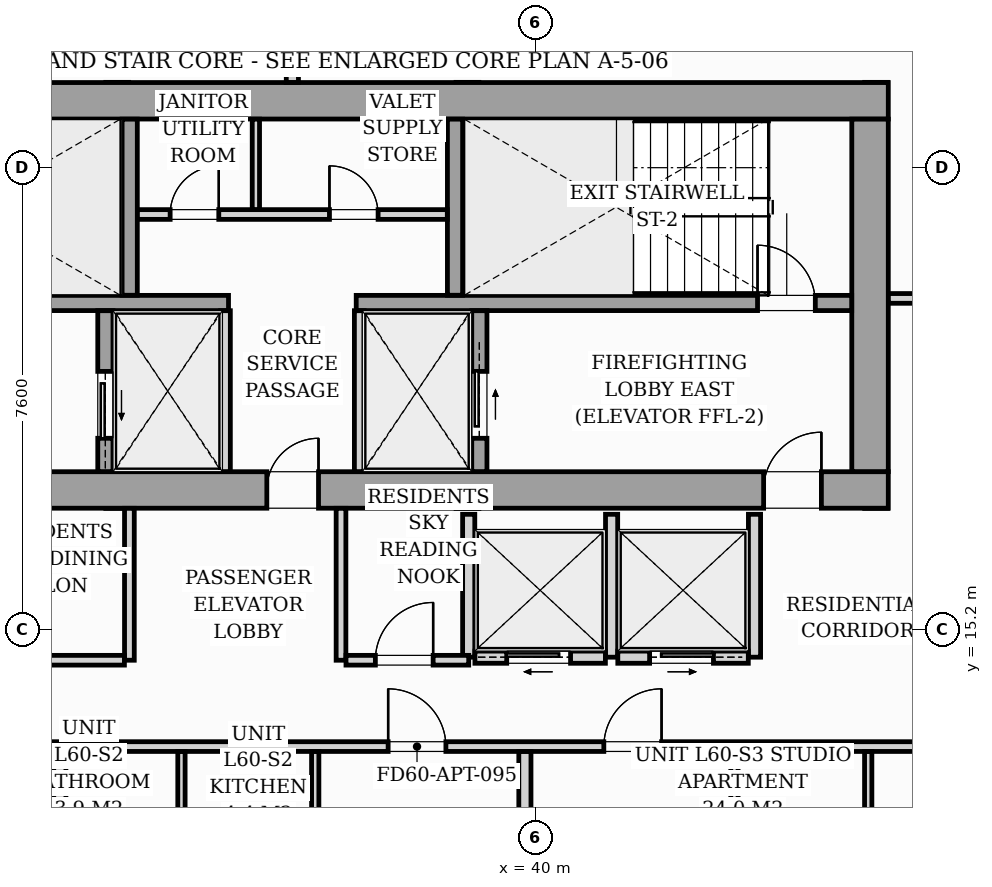
"""IFC4 building model, lengths in metres.
Left out: names, types, materials, properties, quantities, classifications, styles, units other than length and angle.
Written with IfcOpenShell. Run it as: python <this file> out.ifc"""

import sys

from ifc_helpers import new_model, si_unit, direction, frame, frame_2d, origin, origin_2d, place, context, subcontext, project, spatial, rectangle, i_section, extrude, source, transform, mapped, element, fill, save


model = new_model("IFC4")
c1 = context("Model", 3, precision=1e-05, world=origin(), true_north=direction((0.0, 1.0)))
c2 = subcontext(c1, "Body", "Model", "MODEL_VIEW")
j1 = project(units=[si_unit("LENGTHUNIT", "METRE"), si_unit("PLANEANGLEUNIT", "RADIAN")], contexts=[c1])
p1 = place(None, origin())
s1 = spatial("IfcSite", under=j1, at=p1, CompositionType="ELEMENT")
p2 = place(p1, origin())
s2 = spatial("IfcBuilding", under=s1, at=p2, CompositionType="ELEMENT")
p3 = place(p2, frame((0.0, 0.0, 208.2)))
s3 = spatial("IfcBuildingStorey", under=s2, at=p3, CompositionType="ELEMENT", Elevation=208.2)
m1 = source(origin(), c2, "Body", "SweptSolid", [
    extrude(i_section(OverallWidth=0.416, OverallDepth=0.446, WebThickness=0.039, FlangeThickness=0.063, FilletRadius=0.018, at=origin_2d()), origin(), (0.0, 0.0, 1.0), 3.196),
])
for number, where, z_axis, x_axis in (
    (1, (33.12, 17.4, 0.002), (0.0, 0.0, 1.0), (1.0, 0.0, 0.0)),
    (2, (38.88, 17.4, 0.002), (0.0, 0.0, 1.0), (1.0, 0.0, 0.0)),
    (3, (45.6, 17.4, 0.002), (0.0, 0.0, 1.0), (1.0, 0.0, 0.0)),
    (4, (33.12, 24.0, 0.002), (0.0, 0.0, 1.0), (1.0, 0.0, 0.0)),
    (5, (38.88, 24.0, 0.002), (0.0, 0.0, 1.0), (1.0, 0.0, 0.0)),
    (6, (45.6, 24.0, 0.002), (0.0, 0.0, 1.0), (1.0, 0.0, 0.0)),
):
    element("IfcColumn", number, at=place(p3, frame(where, z_axis=z_axis, x_axis=x_axis)), inside=s3, PredefinedType="PILASTER", context=c2, shape_type="MappedRepresentation", body=[
        mapped(m1, transform((0.0, 0.0, 0.0), scale=1.0)),
    ])
p4 = place(p3, frame((26.2, 17.5, 0.0), z_axis=(0.0, 0.0, 1.0), x_axis=(1.0, 0.0, 0.0)))
e7 = element("IfcWall", 7, at=p4, inside=s3, PredefinedType="SHEAR", context=c2, shape_type="SweptSolid", body=[
    extrude(rectangle(XDim=19.6, YDim=0.6, at=frame_2d((9.8, 0.0))), origin(), (0.0, 0.0, 1.0), 3.2),
])
p5 = place(p4, frame((0.95, 0.0, 0.0)))
e8 = element("IfcOpeningElement", 8, at=p5, cuts=e7, PredefinedType="OPENING", context=c2, shape_type="SweptSolid", body=[
    extrude(rectangle(XDim=0.95, YDim=2.06, at=frame_2d((0.475, 1.03))), frame((0.0, 0.31, 0.0), z_axis=(0.0, -1.0, 0.0), x_axis=(1.0, 0.0, 0.0)), (0.0, 0.0, 1.0), 0.62),
])
p6 = place(p4, frame((9.38, 0.0, 0.0)))
e9 = element("IfcOpeningElement", 9, at=p6, cuts=e7, PredefinedType="OPENING", context=c2, shape_type="SweptSolid", body=[
    extrude(rectangle(XDim=0.85, YDim=2.0, at=frame_2d((0.425, 1.0))), frame((0.0, 0.31, 0.0), z_axis=(0.0, -1.0, 0.0), x_axis=(1.0, 0.0, 0.0)), (0.0, 0.0, 1.0), 0.62),
])
p7 = place(p4, frame((17.55, 0.0, 0.0)))
e10 = element("IfcOpeningElement", 10, at=p7, cuts=e7, PredefinedType="OPENING", context=c2, shape_type="SweptSolid", body=[
    extrude(rectangle(XDim=0.95, YDim=2.06, at=frame_2d((0.475, 1.03))), frame((0.0, 0.31, 0.0), z_axis=(0.0, -1.0, 0.0), x_axis=(1.0, 0.0, 0.0)), (0.0, 0.0, 1.0), 0.62),
])
p8 = place(p3, frame((26.2, 23.9, 0.0), z_axis=(0.0, 0.0, 1.0), x_axis=(1.0, 0.0, 0.0)))
e11 = element("IfcWall", 11, at=p8, inside=s3, PredefinedType="SHEAR", context=c2, shape_type="SweptSolid", body=[
    extrude(rectangle(XDim=19.6, YDim=0.6, at=frame_2d((9.8, 0.0))), origin(), (0.0, 0.0, 1.0), 3.2),
])
p9 = place(p3, frame((45.5, 17.802, 0.0), z_axis=(0.0, 0.0, 1.0), x_axis=(0.0, 1.0, 0.0)))
e12 = element("IfcWall", 12, at=p9, inside=s3, PredefinedType="SHEAR", context=c2, shape_type="SweptSolid", body=[
    extrude(rectangle(XDim=5.796, YDim=0.6, at=frame_2d((2.898, 0.0))), origin(), (0.0, 0.0, 1.0), 3.2),
])
p10 = place(p3, frame((26.802, 20.575, 0.0), z_axis=(0.0, 0.0, 1.0), x_axis=(1.0, 0.0, 0.0)))
e13 = element("IfcWall", 13, at=p10, inside=s3, PredefinedType="SOLIDWALL", context=c2, shape_type="SweptSolid", body=[
    extrude(rectangle(XDim=8.148, YDim=0.25, at=frame_2d((4.074, 0.0))), origin(), (0.0, 0.0, 1.0), 3.2),
])
p11 = place(p10, frame((0.298, 0.0, 0.0)))
e14 = element("IfcOpeningElement", 14, at=p11, cuts=e13, PredefinedType="OPENING", context=c2, shape_type="SweptSolid", body=[
    extrude(rectangle(XDim=0.95, YDim=2.06, at=frame_2d((0.475, 1.03))), frame((0.0, 0.135, 0.0), z_axis=(0.0, -1.0, 0.0), x_axis=(1.0, 0.0, 0.0)), (0.0, 0.0, 1.0), 0.27),
])
p12 = place(p3, frame((37.05, 20.575, 0.0), z_axis=(0.0, 0.0, 1.0), x_axis=(1.0, 0.0, 0.0)))
e15 = element("IfcWall", 15, at=p12, inside=s3, PredefinedType="SOLIDWALL", context=c2, shape_type="SweptSolid", body=[
    extrude(rectangle(XDim=8.148, YDim=0.25, at=frame_2d((4.074, 0.0))), origin(), (0.0, 0.0, 1.0), 3.2),
])
p13 = place(p12, frame((6.6, 0.0, 0.0)))
e16 = element("IfcOpeningElement", 16, at=p13, cuts=e15, PredefinedType="OPENING", context=c2, shape_type="SweptSolid", body=[
    extrude(rectangle(XDim=0.95, YDim=2.06, at=frame_2d((0.475, 1.03))), frame((0.0, 0.135, 0.0), z_axis=(0.0, -1.0, 0.0), x_axis=(1.0, 0.0, 0.0)), (0.0, 0.0, 1.0), 0.27),
])
for number, where, z_axis, x_axis in (
    (17, (33.325, 20.702, 0.0), (0.0, 0.0, 1.0), (0.0, 1.0, 0.0)),
    (18, (38.675, 20.702, 0.0), (0.0, 0.0, 1.0), (0.0, 1.0, 0.0)),
):
    element("IfcWall", number, at=place(p3, frame(where, z_axis=z_axis, x_axis=x_axis)), inside=s3, PredefinedType="SOLIDWALL", context=c2, shape_type="SweptSolid", body=[
        extrude(rectangle(XDim=2.896, YDim=0.25, at=frame_2d((1.448, 0.0))), origin(), (0.0, 0.0, 1.0), 3.2),
    ])
p14 = place(p3, frame((32.925, 17.802, 0.0), z_axis=(0.0, 0.0, 1.0), x_axis=(0.0, 1.0, 0.0)))
e19 = element("IfcWall", 19, at=p14, inside=s3, PredefinedType="SOLIDWALL", context=c2, shape_type="SweptSolid", body=[
    extrude(rectangle(XDim=2.646, YDim=0.25, at=frame_2d((1.323, 0.0))), origin(), (0.0, 0.0, 1.0), 3.2),
])
p15 = place(p14, frame((0.548, 0.0, 0.0)))
e20 = element("IfcOpeningElement", 20, at=p15, cuts=e19, PredefinedType="OPENING", context=c2, shape_type="SweptSolid", body=[
    extrude(rectangle(XDim=1.1, YDim=2.08, at=frame_2d((0.55, 1.04))), frame((0.0, 0.135, 0.0), z_axis=(0.0, -1.0, 0.0), x_axis=(1.0, 0.0, 0.0)), (0.0, 0.0, 1.0), 0.27),
])
for number, where, z_axis, x_axis in (
    (21, (34.9, 17.802, 0.0), (0.0, 0.0, 1.0), (0.0, 1.0, 0.0)),
    (22, (37.1, 17.802, 0.0), (0.0, 0.0, 1.0), (0.0, 1.0, 0.0)),
):
    element("IfcWall", number, at=place(p3, frame(where, z_axis=z_axis, x_axis=x_axis)), inside=s3, PredefinedType="PARTITIONING", context=c2, shape_type="SweptSolid", body=[
        extrude(rectangle(XDim=2.646, YDim=0.16, at=frame_2d((1.323, 0.0))), origin(), (0.0, 0.0, 1.0), 2.9),
    ])
p16 = place(p3, frame((39.075, 17.802, 0.0), z_axis=(0.0, 0.0, 1.0), x_axis=(0.0, 1.0, 0.0)))
e23 = element("IfcWall", 23, at=p16, inside=s3, PredefinedType="SOLIDWALL", context=c2, shape_type="SweptSolid", body=[
    extrude(rectangle(XDim=2.646, YDim=0.25, at=frame_2d((1.323, 0.0))), origin(), (0.0, 0.0, 1.0), 3.2),
])
p17 = place(p16, frame((0.548, 0.0, 0.0)))
e24 = element("IfcOpeningElement", 24, at=p17, cuts=e23, PredefinedType="OPENING", context=c2, shape_type="SweptSolid", body=[
    extrude(rectangle(XDim=1.1, YDim=2.08, at=frame_2d((0.55, 1.04))), frame((0.0, 0.135, 0.0), z_axis=(0.0, -1.0, 0.0), x_axis=(1.0, 0.0, 0.0)), (0.0, 0.0, 1.0), 0.27),
])
p18 = place(p3, frame((33.452, 22.03, 0.0), z_axis=(0.0, 0.0, 1.0), x_axis=(1.0, 0.0, 0.0)))
e25 = element("IfcWall", 25, at=p18, inside=s3, PredefinedType="PARTITIONING", context=c2, shape_type="SweptSolid", body=[
    extrude(rectangle(XDim=5.096, YDim=0.16, at=frame_2d((2.548, 0.0))), origin(), (0.0, 0.0, 1.0), 2.9),
])
p19 = place(p18, frame((0.538, 0.0, 0.0)))
e26 = element("IfcOpeningElement", 26, at=p19, cuts=e25, PredefinedType="OPENING", context=c2, shape_type="SweptSolid", body=[
    extrude(rectangle(XDim=0.8, YDim=2.05, at=frame_2d((0.4, 1.025))), frame((0.0, 0.09, 0.0), z_axis=(0.0, -1.0, 0.0), x_axis=(1.0, 0.0, 0.0)), (0.0, 0.0, 1.0), 0.18),
])
p20 = place(p18, frame((3.158, 0.0, 0.0)))
e27 = element("IfcOpeningElement", 27, at=p20, cuts=e25, PredefinedType="OPENING", context=c2, shape_type="SweptSolid", body=[
    extrude(rectangle(XDim=0.8, YDim=2.05, at=frame_2d((0.4, 1.025))), frame((0.0, 0.09, 0.0), z_axis=(0.0, -1.0, 0.0), x_axis=(1.0, 0.0, 0.0)), (0.0, 0.0, 1.0), 0.18),
])
p21 = place(p3, frame((35.4, 22.112, 0.0), z_axis=(0.0, 0.0, 1.0), x_axis=(0.0, 1.0, 0.0)))
e28 = element("IfcWall", 28, at=p21, inside=s3, PredefinedType="PARTITIONING", context=c2, shape_type="SweptSolid", body=[
    extrude(rectangle(XDim=1.486, YDim=0.12, at=frame_2d((0.743, 0.0))), origin(), (0.0, 0.0, 1.0), 2.9),
])
for number, where, z_axis, x_axis in (
    (29, (38.9, 14.75, 0.0), (0.0, 0.0, 1.0), (0.0, 1.0, 0.0)),
    (30, (41.25, 14.75, 0.0), (0.0, 0.0, 1.0), (0.0, 1.0, 0.0)),
    (31, (43.6, 14.75, 0.0), (0.0, 0.0, 1.0), (0.0, 1.0, 0.0)),
):
    element("IfcWall", number, at=place(p3, frame(where, z_axis=z_axis, x_axis=x_axis)), inside=s3, PredefinedType="PARTITIONING", context=c2, shape_type="SweptSolid", body=[
        extrude(rectangle(XDim=2.35, YDim=0.2, at=frame_2d((1.175, 0.0))), origin(), (0.0, 0.0, 1.0), 2.9),
    ])
p22 = place(p3, frame((39.002, 14.75, 0.0), z_axis=(0.0, 0.0, 1.0), x_axis=(1.0, 0.0, 0.0)))
e32 = element("IfcWall", 32, at=p22, inside=s3, PredefinedType="PARTITIONING", context=c2, shape_type="SweptSolid", body=[
    extrude(rectangle(XDim=2.146, YDim=0.2, at=frame_2d((1.073, 0.0))), origin(), (0.0, 0.0, 1.0), 2.9),
])
p23 = place(p22, frame((0.523, 0.0, 0.0)))
e33 = element("IfcOpeningElement", 33, at=p23, cuts=e32, PredefinedType="OPENING", context=c2, shape_type="SweptSolid", body=[
    extrude(rectangle(XDim=1.05, YDim=2.08, at=frame_2d((0.525, 1.04))), frame((0.0, 0.11, 0.0), z_axis=(0.0, -1.0, 0.0), x_axis=(1.0, 0.0, 0.0)), (0.0, 0.0, 1.0), 0.22),
])
p24 = place(p3, frame((41.352, 14.75, 0.0), z_axis=(0.0, 0.0, 1.0), x_axis=(1.0, 0.0, 0.0)))
e34 = element("IfcWall", 34, at=p24, inside=s3, PredefinedType="PARTITIONING", context=c2, shape_type="SweptSolid", body=[
    extrude(rectangle(XDim=2.146, YDim=0.2, at=frame_2d((1.073, 0.0))), origin(), (0.0, 0.0, 1.0), 2.9),
])
p25 = place(p24, frame((0.523, 0.0, 0.0)))
e35 = element("IfcOpeningElement", 35, at=p25, cuts=e34, PredefinedType="OPENING", context=c2, shape_type="SweptSolid", body=[
    extrude(rectangle(XDim=1.05, YDim=2.08, at=frame_2d((0.525, 1.04))), frame((0.0, 0.11, 0.0), z_axis=(0.0, -1.0, 0.0), x_axis=(1.0, 0.0, 0.0)), (0.0, 0.0, 1.0), 0.22),
])
p26 = place(p3, frame((24.55, 13.28, 0.0), z_axis=(0.0, 0.0, 1.0), x_axis=(1.0, 0.0, 0.0)))
e36 = element("IfcWall", 36, at=p26, inside=s3, PredefinedType="PARTITIONING", context=c2, shape_type="SweptSolid", body=[
    extrude(rectangle(XDim=22.9, YDim=0.16, at=frame_2d((11.45, 0.0))), origin(), (0.0, 0.0, 1.0), 2.9),
])
p27 = place(p26, frame((5.378, 0.0, 0.0)))
e37 = element("IfcOpeningElement", 37, at=p27, cuts=e36, PredefinedType="OPENING", context=c2, shape_type="SweptSolid", body=[
    extrude(rectangle(XDim=0.95, YDim=2.06, at=frame_2d((0.475, 1.03))), frame((0.0, 0.09, 0.0), z_axis=(0.0, -1.0, 0.0), x_axis=(1.0, 0.0, 0.0)), (0.0, 0.0, 1.0), 0.18),
])
p28 = place(p26, frame((13.025, 0.0, 0.0)))
e38 = element("IfcOpeningElement", 38, at=p28, cuts=e36, PredefinedType="OPENING", context=c2, shape_type="SweptSolid", body=[
    extrude(rectangle(XDim=0.95, YDim=2.06, at=frame_2d((0.475, 1.03))), frame((0.0, 0.09, 0.0), z_axis=(0.0, -1.0, 0.0), x_axis=(1.0, 0.0, 0.0)), (0.0, 0.0, 1.0), 0.18),
])
p29 = place(p26, frame((16.572, 0.0, 0.0)))
e39 = element("IfcOpeningElement", 39, at=p29, cuts=e36, PredefinedType="OPENING", context=c2, shape_type="SweptSolid", body=[
    extrude(rectangle(XDim=0.95, YDim=2.06, at=frame_2d((0.475, 1.03))), frame((0.0, 0.09, 0.0), z_axis=(0.0, -1.0, 0.0), x_axis=(1.0, 0.0, 0.0)), (0.0, 0.0, 1.0), 0.18),
])
p30 = place(p3, frame((36.0, 24.202, 0.0), z_axis=(0.0, 0.0, 1.0), x_axis=(0.0, 1.0, 0.0)))
e40 = element("IfcWall", 40, at=p30, inside=s3, PredefinedType="PARTITIONING", context=c2, shape_type="SweptSolid", body=[
    extrude(rectangle(XDim=2.152, YDim=0.2, at=frame_2d((1.076, 0.0))), origin(), (0.0, 0.0, 1.0), 2.9),
])
p31 = place(p3, frame((45.802, 20.65, 0.0), z_axis=(0.0, 0.0, 1.0), x_axis=(1.0, 0.0, 0.0)))
e41 = element("IfcWall", 41, at=p31, inside=s3, PredefinedType="PARTITIONING", context=c2, shape_type="SweptSolid", body=[
    extrude(rectangle(XDim=1.566, YDim=0.16, at=frame_2d((0.783, 0.0))), origin(), (0.0, 0.0, 1.0), 2.9),
])
p32 = place(p3, frame((32.176, 7.844, 0.0), z_axis=(0.0, 0.0, 1.0), x_axis=(0.0, 1.0, 0.0)))
e42 = element("IfcWall", 42, at=p32, inside=s3, PredefinedType="PARTITIONING", context=c2, shape_type="SweptSolid", body=[
    extrude(rectangle(XDim=5.354, YDim=0.2, at=frame_2d((2.677, 0.0))), origin(), (0.0, 0.0, 1.0), 2.9),
])
for number, where, z_axis, x_axis in (
    (43, (36.376, 11.092, 0.0), (0.0, 0.0, 1.0), (0.0, 1.0, 0.0)),
    (44, (34.176, 11.092, 0.0), (0.0, 0.0, 1.0), (0.0, 1.0, 0.0)),
):
    element("IfcWall", number, at=place(p3, frame(where, z_axis=z_axis, x_axis=x_axis)), inside=s3, PredefinedType="PARTITIONING", context=c2, shape_type="SweptSolid", body=[
        extrude(rectangle(XDim=2.106, YDim=0.12, at=frame_2d((1.053, 0.0))), origin(), (0.0, 0.0, 1.0), 2.9),
    ])
p33 = place(p3, frame((39.824, 8.398, 0.0), z_axis=(0.0, 0.0, 1.0), x_axis=(0.0, 1.0, 0.0)))
e45 = element("IfcWall", 45, at=p33, inside=s3, PredefinedType="PARTITIONING", context=c2, shape_type="SweptSolid", body=[
    extrude(rectangle(XDim=4.8, YDim=0.2, at=frame_2d((2.4, 0.0))), origin(), (0.0, 0.0, 1.0), 2.9),
])
for number, where, z_axis, x_axis in (
    (46, (43.27, 11.234, 0.0), (0.0, 0.0, 1.0), (0.0, 1.0, 0.0)),
    (47, (45.47, 11.234, 0.0), (0.0, 0.0, 1.0), (0.0, 1.0, 0.0)),
):
    element("IfcWall", number, at=place(p3, frame(where, z_axis=z_axis, x_axis=x_axis)), inside=s3, PredefinedType="PARTITIONING", context=c2, shape_type="SweptSolid", body=[
        extrude(rectangle(XDim=1.964, YDim=0.12, at=frame_2d((0.982, 0.0))), origin(), (0.0, 0.0, 1.0), 2.9),
    ])
p34 = place(p3, frame((33.32, 14.7, 0.0), z_axis=(0.0, 0.0, 1.0), x_axis=(0.0, 1.0, 0.0)))
e48 = element("IfcWall", 48, at=p34, inside=s3, PredefinedType="PARTITIONING", context=c2, shape_type="SweptSolid", body=[
    extrude(rectangle(XDim=2.498, YDim=0.16, at=frame_2d((1.249, 0.0))), origin(), (0.0, 0.0, 1.0), 2.9),
])
p35 = place(p3, frame((28.442, 14.7, 0.0), z_axis=(0.0, 0.0, 1.0), x_axis=(1.0, 0.0, 0.0)))
e49 = element("IfcWall", 49, at=p35, inside=s3, PredefinedType="PARTITIONING", context=c2, shape_type="SweptSolid", body=[
    extrude(rectangle(XDim=4.796, YDim=0.16, at=frame_2d((2.398, 0.0))), origin(), (0.0, 0.0, 1.0), 2.9),
])
p36 = place(p35, frame((1.923, 0.0, 0.0)))
e50 = element("IfcOpeningElement", 50, at=p36, cuts=e49, PredefinedType="OPENING", context=c2, shape_type="SweptSolid", body=[
    extrude(rectangle(XDim=0.95, YDim=2.06, at=frame_2d((0.475, 1.03))), frame((0.0, 0.09, 0.0), z_axis=(0.0, -1.0, 0.0), x_axis=(1.0, 0.0, 0.0)), (0.0, 0.0, 1.0), 0.18),
])
p37 = place(p3, frame((36.8, 14.7, 0.0), z_axis=(0.0, 0.0, 1.0), x_axis=(0.0, 1.0, 0.0)))
e51 = element("IfcWall", 51, at=p37, inside=s3, PredefinedType="PARTITIONING", context=c2, shape_type="SweptSolid", body=[
    extrude(rectangle(XDim=2.498, YDim=0.16, at=frame_2d((1.249, 0.0))), origin(), (0.0, 0.0, 1.0), 2.9),
])
p38 = place(p3, frame((36.882, 14.7, 0.0), z_axis=(0.0, 0.0, 1.0), x_axis=(1.0, 0.0, 0.0)))
e52 = element("IfcWall", 52, at=p38, inside=s3, PredefinedType="PARTITIONING", context=c2, shape_type="SweptSolid", body=[
    extrude(rectangle(XDim=2.018, YDim=0.16, at=frame_2d((1.009, 0.0))), origin(), (0.0, 0.0, 1.0), 2.9),
])
p39 = place(p38, frame((0.483, 0.0, 0.0)))
e53 = element("IfcOpeningElement", 53, at=p39, cuts=e52, PredefinedType="OPENING", context=c2, shape_type="SweptSolid", body=[
    extrude(rectangle(XDim=0.95, YDim=2.06, at=frame_2d((0.475, 1.03))), frame((0.0, 0.09, 0.0), z_axis=(0.0, -1.0, 0.0), x_axis=(1.0, 0.0, 0.0)), (0.0, 0.0, 1.0), 0.18),
])
m2 = source(origin(), c2, "Body", "SweptSolid", [
    extrude(rectangle(XDim=0.85, YDim=2.0, at=frame_2d((0.425, 1.0))), frame((0.0, 0.025, 0.0), z_axis=(0.0, -1.0, 0.0), x_axis=(1.0, 0.0, 0.0)), (0.0, 0.0, 1.0), 0.05),
])
p40 = place(p6, origin())
e54 = element("IfcDoor", 54, at=p40, inside=s3, OperationType="SINGLE_SWING_RIGHT", PredefinedType="DOOR", context=c2, shape_type="MappedRepresentation", body=[
    mapped(m2, transform((0.0, 0.0, 0.0), scale=1.0)),
])
fill(e9, e54)
m3 = source(origin(), c2, "Body", "SweptSolid", [
    extrude(rectangle(XDim=0.95, YDim=2.06, at=frame_2d((0.475, 1.03))), frame((0.0, 0.025, 0.0), z_axis=(0.0, -1.0, 0.0), x_axis=(1.0, 0.0, 0.0)), (0.0, 0.0, 1.0), 0.05),
])
p41 = place(p7, origin())
e55 = element("IfcDoor", 55, at=p41, inside=s3, OperationType="SINGLE_SWING_RIGHT", PredefinedType="DOOR", context=c2, shape_type="MappedRepresentation", body=[
    mapped(m3, transform((0.0, 0.0, 0.0), scale=1.0)),
])
fill(e10, e55)
p42 = place(p13, origin())
e56 = element("IfcDoor", 56, at=p42, inside=s3, OperationType="SINGLE_SWING_LEFT", PredefinedType="DOOR", context=c2, shape_type="MappedRepresentation", body=[
    mapped(m3, transform((0.0, 0.0, 0.0), scale=1.0)),
])
fill(e16, e56)
m4 = source(origin(), c2, "Body", "SweptSolid", [
    extrude(rectangle(XDim=1.1, YDim=2.08, at=frame_2d((0.55, 1.04))), frame((0.0, 0.025, 0.0), z_axis=(0.0, -1.0, 0.0), x_axis=(1.0, 0.0, 0.0)), (0.0, 0.0, 1.0), 0.05),
])
p43 = place(p15, origin())
e57 = element("IfcDoor", 57, at=p43, inside=s3, OperationType="SLIDING_TO_LEFT", PredefinedType="DOOR", context=c2, shape_type="MappedRepresentation", body=[
    mapped(m4, transform((0.0, 0.0, 0.0), scale=1.0)),
])
fill(e20, e57)
p44 = place(p17, origin())
e58 = element("IfcDoor", 58, at=p44, inside=s3, OperationType="SLIDING_TO_RIGHT", PredefinedType="DOOR", context=c2, shape_type="MappedRepresentation", body=[
    mapped(m4, transform((0.0, 0.0, 0.0), scale=1.0)),
])
fill(e24, e58)
m5 = source(origin(), c2, "Body", "SweptSolid", [
    extrude(rectangle(XDim=0.8, YDim=2.05, at=frame_2d((0.4, 1.025))), frame((0.0, 0.025, 0.0), z_axis=(0.0, -1.0, 0.0), x_axis=(1.0, 0.0, 0.0)), (0.0, 0.0, 1.0), 0.05),
])
p45 = place(p19, origin())
e59 = element("IfcDoor", 59, at=p45, inside=s3, OperationType="SINGLE_SWING_RIGHT", PredefinedType="DOOR", context=c2, shape_type="MappedRepresentation", body=[
    mapped(m5, transform((0.0, 0.0, 0.0), scale=1.0)),
])
fill(e26, e59)
p46 = place(p20, origin())
e60 = element("IfcDoor", 60, at=p46, inside=s3, OperationType="SINGLE_SWING_LEFT", PredefinedType="DOOR", context=c2, shape_type="MappedRepresentation", body=[
    mapped(m5, transform((0.0, 0.0, 0.0), scale=1.0)),
])
fill(e27, e60)
m6 = source(origin(), c2, "Body", "SweptSolid", [
    extrude(rectangle(XDim=1.05, YDim=2.08, at=frame_2d((0.525, 1.04))), frame((0.0, 0.025, 0.0), z_axis=(0.0, -1.0, 0.0), x_axis=(1.0, 0.0, 0.0)), (0.0, 0.0, 1.0), 0.05),
])
p47 = place(p23, origin())
e61 = element("IfcDoor", 61, at=p47, inside=s3, OperationType="SLIDING_TO_LEFT", PredefinedType="DOOR", context=c2, shape_type="MappedRepresentation", body=[
    mapped(m6, transform((0.0, 0.0, 0.0), scale=1.0)),
])
fill(e33, e61)
p48 = place(p25, origin())
e62 = element("IfcDoor", 62, at=p48, inside=s3, OperationType="SLIDING_TO_RIGHT", PredefinedType="DOOR", context=c2, shape_type="MappedRepresentation", body=[
    mapped(m6, transform((0.0, 0.0, 0.0), scale=1.0)),
])
fill(e35, e62)
m7 = source(origin(), c2, "Body", "SweptSolid", [
    extrude(rectangle(XDim=0.95, YDim=2.06, at=frame_2d((0.475, 1.03))), frame((0.0, 0.025, 0.0), z_axis=(0.0, -1.0, 0.0), x_axis=(1.0, 0.0, 0.0)), (0.0, 0.0, 1.0), 0.05),
])
p49 = place(p28, origin())
e63 = element("IfcDoor", 63, at=p49, inside=s3, OperationType="SINGLE_SWING_LEFT", PredefinedType="DOOR", context=c2, shape_type="MappedRepresentation", body=[
    mapped(m7, transform((0.0, 0.0, 0.0), scale=1.0)),
])
fill(e38, e63)
p50 = place(p29, origin())
e64 = element("IfcDoor", 64, at=p50, inside=s3, OperationType="SINGLE_SWING_RIGHT", PredefinedType="DOOR", context=c2, shape_type="MappedRepresentation", body=[
    mapped(m7, transform((0.0, 0.0, 0.0), scale=1.0)),
])
fill(e39, e64)
p51 = place(p39, origin())
e65 = element("IfcDoor", 65, at=p51, inside=s3, OperationType="SINGLE_SWING_RIGHT", PredefinedType="DOOR", context=c2, shape_type="MappedRepresentation", body=[
    mapped(m7, transform((0.0, 0.0, 0.0), scale=1.0)),
])
fill(e53, e65)
save(model, sys.argv[1])
